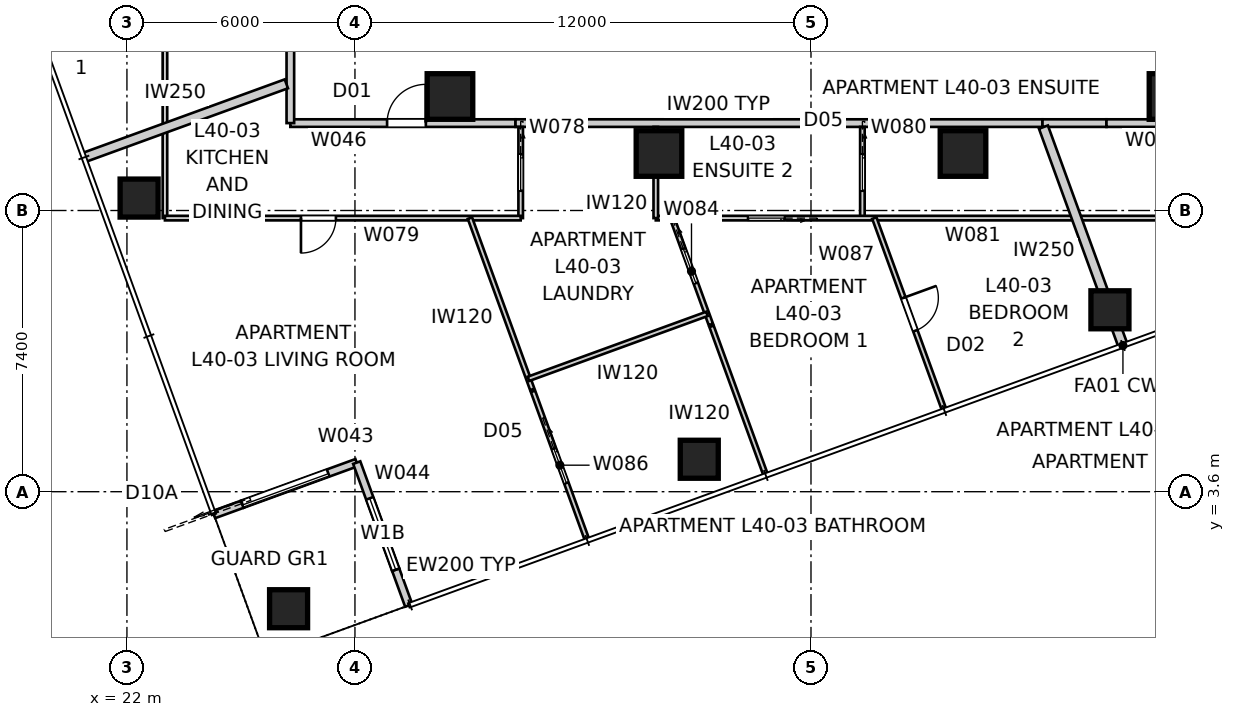
"""IFC4 building model, lengths in metres.
Left out: names, types, materials, properties, quantities, classifications, styles, units other than length and angle.
Written with IfcOpenShell. Run it as: python <this file> out.ifc"""

import sys

from ifc_helpers import new_model, si_unit, direction, frame, frame_2d, origin, origin_2d, place, context, subcontext, project, spatial, rectangle, extrude, element, fill, save


model = new_model("IFC4")
c1 = context("Model", 3, precision=1e-05, world=origin(), true_north=direction((0.0, 1.0)))
c2 = subcontext(c1, "Body", "Model", "MODEL_VIEW")
j1 = project(units=[si_unit("LENGTHUNIT", "METRE"), si_unit("PLANEANGLEUNIT", "RADIAN")], contexts=[c1])
p1 = place(None, origin())
s1 = spatial("IfcSite", under=j1, at=p1, CompositionType="ELEMENT")
p2 = place(p1, origin())
s2 = spatial("IfcBuilding", under=s1, at=p2, CompositionType="ELEMENT")
p3 = place(p2, frame((0.0, 0.0, 147.2)))
s3 = spatial("IfcBuildingStorey", under=s2, at=p3, CompositionType="ELEMENT", Elevation=147.2)
for number, where, z_axis, x_axis in (
    (1, (26.253, 0.521, 0.0), (0.0, 0.0, 1.0), (1.0, 0.0, 0.0)),
    (2, (37.06, 4.454, 0.0), (0.0, 0.0, 1.0), (1.0, 0.0, 0.0)),
    (3, (47.866, 8.387, 0.0), (0.0, 0.0, 1.0), (1.0, 0.0, 0.0)),
    (4, (22.32, 11.327, 0.0), (0.0, 0.0, 1.0), (1.0, 0.0, 0.0)),
):
    element("IfcColumn", number, at=place(p3, frame(where, z_axis=z_axis, x_axis=x_axis)), inside=s3, PredefinedType="COLUMN", context=c2, shape_type="SweptSolid", body=[
        extrude(rectangle(XDim=1.0, YDim=1.0, at=origin_2d()), origin(), (0.0, 0.0, 1.0), 3.4),
    ])
for number, where, z_axis, x_axis in (
    (5, (30.5, 14.0, 0.0), (0.0, 0.0, 1.0), (1.0, 0.0, 0.0)),
    (6, (36.0, 12.5, 0.0), (0.0, 0.0, 1.0), (1.0, 0.0, 0.0)),
    (7, (44.0, 12.5, 0.0), (0.0, 0.0, 1.0), (1.0, 0.0, 0.0)),
    (8, (49.5, 14.0, 0.0), (0.0, 0.0, 1.0), (1.0, 0.0, 0.0)),
):
    element("IfcColumn", number, at=place(p3, frame(where, z_axis=z_axis, x_axis=x_axis)), inside=s3, PredefinedType="COLUMN", context=c2, shape_type="SweptSolid", body=[
        extrude(rectangle(XDim=1.2, YDim=1.2, at=origin_2d()), origin(), (0.0, 0.0, 1.0), 3.4),
    ])
p4 = place(p3, frame((24.288, 2.998, 0.0), z_axis=(0.0, 0.0, 1.0), x_axis=(0.939659694648, 0.342110593602, 0.0)))
e9 = element("IfcWall", 9, at=p4, inside=s3, PredefinedType="SOLIDWALL", context=c2, shape_type="SweptSolid", body=[
    extrude(rectangle(XDim=0.8, YDim=0.2, at=frame_2d((0.4, 0.0))), origin(), (0.0, 0.0, 1.0), 3.25),
])
p5 = place(p3, frame((25.04, 3.271, 0.0), z_axis=(0.0, 0.0, 1.0), x_axis=(0.939693144909, 0.342018703306, 0.0)))
e10 = element("IfcWall", 10, at=p5, inside=s3, PredefinedType="SOLIDWALL", context=c2, shape_type="SweptSolid", body=[
    extrude(rectangle(XDim=3.2, YDim=0.2, at=frame_2d((1.6, 0.0))), origin(), (0.0, 0.0, 1.0), 2.722),
])
p6 = place(p5, origin())
e11 = element("IfcOpeningElement", 11, at=p6, cuts=e10, PredefinedType="OPENING", context=c2, shape_type="SweptSolid", body=[
    extrude(rectangle(XDim=2.4, YDim=2.1, at=frame_2d((1.2, 1.05))), frame((0.0, 0.11, 0.0), z_axis=(0.0, -1.0, 0.0), x_axis=(1.0, 0.0, 0.0)), (0.0, 0.0, 1.0), 0.22),
])
p7 = place(p3, frame((28.047, 4.366, 0.0), z_axis=(0.0, 0.0, 1.0), x_axis=(0.341965219194, -0.939712609717, 0.0)))
e12 = element("IfcWall", 12, at=p7, inside=s3, PredefinedType="SOLIDWALL", context=c2, shape_type="SweptSolid", body=[
    extrude(rectangle(XDim=3.0, YDim=0.2, at=frame_2d((1.5, 0.0))), origin(), (0.0, 0.0, 1.0), 2.722),
])
p8 = place(p7, frame((1.0, 0.0, 0.45)))
e13 = element("IfcOpeningElement", 13, at=p8, cuts=e12, PredefinedType="OPENING", context=c2, shape_type="SweptSolid", body=[
    extrude(rectangle(XDim=2.0, YDim=1.8, at=frame_2d((1.0, 0.9))), frame((0.0, 0.11, 0.0), z_axis=(0.0, -1.0, 0.0), x_axis=(1.0, 0.0, 0.0)), (0.0, 0.0, 1.0), 0.22),
])
p9 = place(p3, frame((29.073, 1.547, 0.0), z_axis=(0.0, 0.0, 1.0), x_axis=(0.342037080957, -0.939686455819, 0.0)))
e14 = element("IfcWall", 14, at=p9, inside=s3, PredefinedType="SOLIDWALL", context=c2, shape_type="SweptSolid", body=[
    extrude(rectangle(XDim=1.0, YDim=0.2, at=frame_2d((0.5, 0.0))), origin(), (0.0, 0.0, 1.0), 3.25),
])
p10 = place(p3, frame((26.3, 13.3, 0.0), z_axis=(0.0, 0.0, 1.0), x_axis=(1.0, 0.0, 0.0)))
e15 = element("IfcWall", 15, at=p10, inside=s3, PredefinedType="PARTITIONING", context=c2, shape_type="SweptSolid", body=[
    extrude(rectangle(XDim=5.925, YDim=0.2, at=frame_2d((2.962, 0.0))), origin(), (0.0, 0.0, 1.0), 3.25),
])
p11 = place(p10, frame((2.545, 0.0, 0.0)))
e16 = element("IfcOpeningElement", 16, at=p11, cuts=e15, PredefinedType="OPENING", context=c2, shape_type="SweptSolid", body=[
    extrude(rectangle(XDim=1.02, YDim=2.34, at=frame_2d((0.51, 1.17))), frame((0.0, 0.11, 0.0), z_axis=(0.0, -1.0, 0.0), x_axis=(1.0, 0.0, 0.0)), (0.0, 0.0, 1.0), 0.22),
])
p12 = place(p3, frame((32.225, 13.3, 0.0), z_axis=(0.0, 0.0, 1.0), x_axis=(1.0, 0.0, 0.0)))
e17 = element("IfcWall", 17, at=p12, inside=s3, PredefinedType="PARTITIONING", context=c2, shape_type="SweptSolid", body=[
    extrude(rectangle(XDim=1.684, YDim=0.2, at=frame_2d((0.842, 0.0))), origin(), (0.0, 0.0, 1.0), 2.55),
])
p13 = place(p3, frame((33.908, 13.3, 0.0), z_axis=(0.0, 0.0, 1.0), x_axis=(1.0, 0.0, 0.0)))
e18 = element("IfcWall", 18, at=p13, inside=s3, PredefinedType="PARTITIONING", context=c2, shape_type="SweptSolid", body=[
    extrude(rectangle(XDim=12.183, YDim=0.2, at=frame_2d((6.092, 0.0))), origin(), (0.0, 0.0, 1.0), 3.25),
])
p14 = place(p3, frame((46.092, 13.3, 0.0), z_axis=(0.0, 0.0, 1.0), x_axis=(1.0, 0.0, 0.0)))
e19 = element("IfcWall", 19, at=p14, inside=s3, PredefinedType="PARTITIONING", context=c2, shape_type="SweptSolid", body=[
    extrude(rectangle(XDim=1.684, YDim=0.2, at=frame_2d((0.842, 0.0))), origin(), (0.0, 0.0, 1.0), 2.55),
])
p15 = place(p3, frame((47.775, 13.3, 0.0), z_axis=(0.0, 0.0, 1.0), x_axis=(1.0, 0.0, 0.0)))
e20 = element("IfcWall", 20, at=p15, inside=s3, PredefinedType="PARTITIONING", context=c2, shape_type="SweptSolid", body=[
    extrude(rectangle(XDim=5.925, YDim=0.2, at=frame_2d((2.962, 0.0))), origin(), (0.0, 0.0, 1.0), 3.25),
])
p16 = place(p15, frame((2.453, 0.0, 0.0)))
e21 = element("IfcOpeningElement", 21, at=p16, cuts=e20, PredefinedType="OPENING", context=c2, shape_type="SweptSolid", body=[
    extrude(rectangle(XDim=1.02, YDim=2.34, at=frame_2d((0.51, 1.17))), frame((0.0, 0.11, 0.0), z_axis=(0.0, -1.0, 0.0), x_axis=(1.0, 0.0, 0.0)), (0.0, 0.0, 1.0), 0.22),
])
p17 = place(p3, frame((26.3, 46.3, 0.0), z_axis=(0.0, 0.0, 1.0), x_axis=(0.0, -1.0, 0.0)))
e22 = element("IfcWall", 22, at=p17, inside=s3, PredefinedType="PARTITIONING", context=c2, shape_type="SweptSolid", body=[
    extrude(rectangle(XDim=33.0, YDim=0.2, at=frame_2d((16.5, 0.0))), origin(), (0.0, 0.0, 1.0), 3.25),
])
p18 = place(p17, frame((13.229, 0.0, 0.0)))
e23 = element("IfcOpeningElement", 23, at=p18, cuts=e22, PredefinedType="OPENING", context=c2, shape_type="SweptSolid", body=[
    extrude(rectangle(XDim=1.02, YDim=2.34, at=frame_2d((0.51, 1.17))), frame((0.0, 0.11, 0.0), z_axis=(0.0, -1.0, 0.0), x_axis=(1.0, 0.0, 0.0)), (0.0, 0.0, 1.0), 0.22),
])
p19 = place(p17, frame((28.51, 0.0, 0.0)))
e24 = element("IfcOpeningElement", 24, at=p19, cuts=e22, PredefinedType="OPENING", context=c2, shape_type="SweptSolid", body=[
    extrude(rectangle(XDim=1.02, YDim=2.34, at=frame_2d((0.51, 1.17))), frame((0.0, 0.11, 0.0), z_axis=(0.0, -1.0, 0.0), x_axis=(1.0, 0.0, 0.0)), (0.0, 0.0, 1.0), 0.22),
])
p20 = place(p17, frame((1.998, 0.0, 0.0)))
e25 = element("IfcOpeningElement", 25, at=p20, cuts=e22, PredefinedType="OPENING", context=c2, shape_type="SweptSolid", body=[
    extrude(rectangle(XDim=1.02, YDim=2.34, at=frame_2d((0.51, 1.17))), frame((0.0, 0.11, 0.0), z_axis=(0.0, -1.0, 0.0), x_axis=(1.0, 0.0, 0.0)), (0.0, 0.0, 1.0), 0.22),
])
p21 = place(p3, frame((48.208, 7.447, 0.0), z_axis=(0.0, 0.0, 1.0), x_axis=(-0.341999444481, 0.939700154291, 0.0)))
e26 = element("IfcWall", 26, at=p21, inside=s3, PredefinedType="PARTITIONING", context=c2, shape_type="SweptSolid", body=[
    extrude(rectangle(XDim=6.116, YDim=0.25, at=frame_2d((3.058, 0.0))), origin(), (0.0, 0.0, 1.0), 3.25),
])
p22 = place(p3, frame((20.868, 12.395, 0.0), z_axis=(0.0, 0.0, 1.0), x_axis=(0.939690274876, 0.342026588591, 0.0)))
e27 = element("IfcWall", 27, at=p22, inside=s3, PredefinedType="PARTITIONING", context=c2, shape_type="SweptSolid", body=[
    extrude(rectangle(XDim=5.669, YDim=0.25, at=frame_2d((2.834, 0.0))), origin(), (0.0, 0.0, 1.0), 3.25),
])
p23 = place(p3, frame((23.0, 10.8, 0.0), z_axis=(0.0, 0.0, 1.0), x_axis=(0.0, 1.0, 0.0)))
e28 = element("IfcWall", 28, at=p23, inside=s3, PredefinedType="PARTITIONING", context=c2, shape_type="SweptSolid", body=[
    extrude(rectangle(XDim=38.0, YDim=0.12, at=frame_2d((19.0, 0.0))), origin(), (0.0, 0.0, 1.0), 2.55),
])
p24 = place(p23, frame((20.674, 0.0, 0.0)))
e29 = element("IfcOpeningElement", 29, at=p24, cuts=e28, PredefinedType="OPENING", context=c2, shape_type="SweptSolid", body=[
    extrude(rectangle(XDim=0.92, YDim=2.34, at=frame_2d((0.46, 1.17))), frame((0.0, 0.07, 0.0), z_axis=(0.0, -1.0, 0.0), x_axis=(1.0, 0.0, 0.0)), (0.0, 0.0, 1.0), 0.14),
])
p25 = place(p23, frame((4.598, 0.0, 0.0)))
e30 = element("IfcOpeningElement", 30, at=p25, cuts=e28, PredefinedType="OPENING", context=c2, shape_type="SweptSolid", body=[
    extrude(rectangle(XDim=0.92, YDim=2.34, at=frame_2d((0.46, 1.17))), frame((0.0, 0.07, 0.0), z_axis=(0.0, -1.0, 0.0), x_axis=(1.0, 0.0, 0.0)), (0.0, 0.0, 1.0), 0.14),
])
p26 = place(p23, frame((8.043, 0.0, 0.0)))
e31 = element("IfcOpeningElement", 31, at=p26, cuts=e28, PredefinedType="OPENING", context=c2, shape_type="SweptSolid", body=[
    extrude(rectangle(XDim=0.92, YDim=2.34, at=frame_2d((0.46, 1.17))), frame((0.0, 0.07, 0.0), z_axis=(0.0, -1.0, 0.0), x_axis=(1.0, 0.0, 0.0)), (0.0, 0.0, 1.0), 0.14),
])
p27 = place(p23, frame((33.957, 0.0, 0.0)))
e32 = element("IfcOpeningElement", 32, at=p27, cuts=e28, PredefinedType="OPENING", context=c2, shape_type="SweptSolid", body=[
    extrude(rectangle(XDim=0.92, YDim=2.34, at=frame_2d((0.46, 1.17))), frame((0.0, 0.07, 0.0), z_axis=(0.0, -1.0, 0.0), x_axis=(1.0, 0.0, 0.0)), (0.0, 0.0, 1.0), 0.14),
])
p28 = place(p23, frame((26.957, 0.0, 0.0)))
e33 = element("IfcOpeningElement", 33, at=p28, cuts=e28, PredefinedType="OPENING", context=c2, shape_type="SweptSolid", body=[
    extrude(rectangle(XDim=0.96, YDim=2.1, at=frame_2d((0.48, 1.05))), frame((0.0, 0.07, 0.0), z_axis=(0.0, -1.0, 0.0), x_axis=(1.0, 0.0, 0.0)), (0.0, 0.0, 1.0), 0.14),
])
p29 = place(p3, frame((32.361, 13.2, 0.0), z_axis=(0.0, 0.0, 1.0), x_axis=(0.0, -1.0, 0.0)))
e34 = element("IfcWall", 34, at=p29, inside=s3, PredefinedType="PARTITIONING", context=c2, shape_type="SweptSolid", body=[
    extrude(rectangle(XDim=2.4, YDim=0.12, at=frame_2d((1.2, 0.0))), origin(), (0.0, 0.0, 1.0), 3.25),
])
p30 = place(p29, frame((0.72, 0.0, 0.0)))
e35 = element("IfcOpeningElement", 35, at=p30, cuts=e34, PredefinedType="OPENING", context=c2, shape_type="SweptSolid", body=[
    extrude(rectangle(XDim=0.96, YDim=2.1, at=frame_2d((0.48, 1.05))), frame((0.0, 0.07, 0.0), z_axis=(0.0, -1.0, 0.0), x_axis=(1.0, 0.0, 0.0)), (0.0, 0.0, 1.0), 0.14),
])
p31 = place(p3, frame((32.361, 10.8, 0.0), z_axis=(0.0, 0.0, 1.0), x_axis=(-1.0, 0.0, 0.0)))
e36 = element("IfcWall", 36, at=p31, inside=s3, PredefinedType="PARTITIONING", context=c2, shape_type="SweptSolid", body=[
    extrude(rectangle(XDim=9.361, YDim=0.12, at=frame_2d((4.681, 0.0))), origin(), (0.0, 0.0, 1.0), 3.25),
])
p32 = place(p31, frame((4.862, 0.0, 0.0)))
e37 = element("IfcOpeningElement", 37, at=p32, cuts=e36, PredefinedType="OPENING", context=c2, shape_type="SweptSolid", body=[
    extrude(rectangle(XDim=0.92, YDim=2.34, at=frame_2d((0.46, 1.17))), frame((0.0, 0.07, 0.0), z_axis=(0.0, -1.0, 0.0), x_axis=(1.0, 0.0, 0.0)), (0.0, 0.0, 1.0), 0.14),
])
p33 = place(p3, frame((41.353, 13.2, 0.0), z_axis=(0.0, 0.0, 1.0), x_axis=(0.0, -1.0, 0.0)))
e38 = element("IfcWall", 38, at=p33, inside=s3, PredefinedType="PARTITIONING", context=c2, shape_type="SweptSolid", body=[
    extrude(rectangle(XDim=2.4, YDim=0.12, at=frame_2d((1.2, 0.0))), origin(), (0.0, 0.0, 1.0), 3.25),
])
p34 = place(p33, frame((0.72, 0.0, 0.0)))
e39 = element("IfcOpeningElement", 39, at=p34, cuts=e38, PredefinedType="OPENING", context=c2, shape_type="SweptSolid", body=[
    extrude(rectangle(XDim=0.96, YDim=2.1, at=frame_2d((0.48, 1.05))), frame((0.0, 0.07, 0.0), z_axis=(0.0, -1.0, 0.0), x_axis=(1.0, 0.0, 0.0)), (0.0, 0.0, 1.0), 0.14),
])
p35 = place(p3, frame((53.8, 10.8, 0.0), z_axis=(0.0, 0.0, 1.0), x_axis=(-1.0, 0.0, 0.0)))
e40 = element("IfcWall", 40, at=p35, inside=s3, PredefinedType="PARTITIONING", context=c2, shape_type="SweptSolid", body=[
    extrude(rectangle(XDim=17.884, YDim=0.12, at=frame_2d((8.942, 0.0))), origin(), (0.0, 0.0, 1.0), 3.25),
])
p36 = place(p35, frame((3.665, 0.0, 0.0)))
e41 = element("IfcOpeningElement", 41, at=p36, cuts=e40, PredefinedType="OPENING", context=c2, shape_type="SweptSolid", body=[
    extrude(rectangle(XDim=0.92, YDim=2.34, at=frame_2d((0.46, 1.17))), frame((0.0, 0.07, 0.0), z_axis=(0.0, -1.0, 0.0), x_axis=(1.0, 0.0, 0.0)), (0.0, 0.0, 1.0), 0.14),
])
p37 = place(p35, frame((14.497, 0.0, 0.0)))
e42 = element("IfcOpeningElement", 42, at=p37, cuts=e40, PredefinedType="OPENING", context=c2, shape_type="SweptSolid", body=[
    extrude(rectangle(XDim=0.96, YDim=2.1, at=frame_2d((0.48, 1.05))), frame((0.0, 0.07, 0.0), z_axis=(0.0, -1.0, 0.0), x_axis=(1.0, 0.0, 0.0)), (0.0, 0.0, 1.0), 0.14),
])
p38 = place(p3, frame((35.916, 10.8, 0.0), z_axis=(0.0, 0.0, 1.0), x_axis=(0.0, 1.0, 0.0)))
e43 = element("IfcWall", 43, at=p38, inside=s3, PredefinedType="PARTITIONING", context=c2, shape_type="SweptSolid", body=[
    extrude(rectangle(XDim=2.4, YDim=0.12, at=frame_2d((1.2, 0.0))), origin(), (0.0, 0.0, 1.0), 3.25),
])
p39 = place(p3, frame((32.666, 6.292, 0.0), z_axis=(0.0, 0.0, 1.0), x_axis=(-0.341988220281, 0.93970423921, 0.0)))
e44 = element("IfcWall", 44, at=p39, inside=s3, PredefinedType="PARTITIONING", context=c2, shape_type="SweptSolid", body=[
    extrude(rectangle(XDim=4.797, YDim=0.12, at=frame_2d((2.399, 0.0))), origin(), (0.0, 0.0, 1.0), 3.25),
])
p40 = place(p3, frame((36.346, 10.8, 0.0), z_axis=(0.0, 0.0, 1.0), x_axis=(0.341986632257, -0.939704817141, 0.0)))
e45 = element("IfcWall", 45, at=p40, inside=s3, PredefinedType="PARTITIONING", context=c2, shape_type="SweptSolid", body=[
    extrude(rectangle(XDim=2.978, YDim=0.12, at=frame_2d((1.489, 0.0))), origin(), (0.0, 0.0, 1.0), 3.25),
])
p41 = place(p40, frame((0.861, 0.0, 0.0)))
e46 = element("IfcOpeningElement", 46, at=p41, cuts=e45, PredefinedType="OPENING", context=c2, shape_type="SweptSolid", body=[
    extrude(rectangle(XDim=0.96, YDim=2.1, at=frame_2d((0.48, 1.05))), frame((0.0, 0.07, 0.0), z_axis=(0.0, -1.0, 0.0), x_axis=(1.0, 0.0, 0.0)), (0.0, 0.0, 1.0), 0.14),
])
p42 = place(p3, frame((37.264, 8.28, 0.0), z_axis=(0.0, 0.0, 1.0), x_axis=(-0.939686455819, -0.342037080957, 0.0)))
e47 = element("IfcWall", 47, at=p42, inside=s3, PredefinedType="PARTITIONING", context=c2, shape_type="SweptSolid", body=[
    extrude(rectangle(XDim=5.0, YDim=0.12, at=frame_2d((2.5, 0.0))), origin(), (0.0, 0.0, 1.0), 3.25),
])
p43 = place(p3, frame((32.685, 6.241, 0.0), z_axis=(0.0, 0.0, 1.0), x_axis=(0.342036918442, -0.939686514973, 0.0)))
e48 = element("IfcWall", 48, at=p43, inside=s3, PredefinedType="PARTITIONING", context=c2, shape_type="SweptSolid", body=[
    extrude(rectangle(XDim=4.136, YDim=0.12, at=frame_2d((2.068, 0.0))), origin(), (0.0, 0.0, 1.0), 3.25),
])
p44 = place(p43, frame((1.608, 0.0, 0.0)))
e49 = element("IfcOpeningElement", 49, at=p44, cuts=e48, PredefinedType="OPENING", context=c2, shape_type="SweptSolid", body=[
    extrude(rectangle(XDim=0.96, YDim=2.1, at=frame_2d((0.48, 1.05))), frame((0.0, 0.07, 0.0), z_axis=(0.0, -1.0, 0.0), x_axis=(1.0, 0.0, 0.0)), (0.0, 0.0, 1.0), 0.14),
])
p45 = place(p3, frame((41.667, 10.8, 0.0), z_axis=(0.0, 0.0, 1.0), x_axis=(0.341995981916, -0.939701414468, 0.0)))
e50 = element("IfcWall", 50, at=p45, inside=s3, PredefinedType="PARTITIONING", context=c2, shape_type="SweptSolid", body=[
    extrude(rectangle(XDim=5.348, YDim=0.12, at=frame_2d((2.674, 0.0))), origin(), (0.0, 0.0, 1.0), 3.25),
])
p46 = place(p45, frame((2.234, 0.0, 0.0)))
e51 = element("IfcOpeningElement", 51, at=p46, cuts=e50, PredefinedType="OPENING", context=c2, shape_type="SweptSolid", body=[
    extrude(rectangle(XDim=0.92, YDim=2.34, at=frame_2d((0.46, 1.17))), frame((0.0, 0.07, 0.0), z_axis=(0.0, -1.0, 0.0), x_axis=(1.0, 0.0, 0.0)), (0.0, 0.0, 1.0), 0.14),
])
p47 = place(p3, frame((38.798, 4.065, 0.0), z_axis=(0.0, 0.0, 1.0), x_axis=(-0.342036918442, 0.939686514973, 0.0)))
e52 = element("IfcWall", 52, at=p47, inside=s3, PredefinedType="PARTITIONING", context=c2, shape_type="SweptSolid", body=[
    extrude(rectangle(XDim=4.136, YDim=0.12, at=frame_2d((2.068, 0.0))), origin(), (0.0, 0.0, 1.0), 3.25),
])
p48 = place(p6, origin())
e53 = element("IfcDoor", 53, at=p48, inside=s3, OperationType="SLIDING_TO_LEFT", PredefinedType="DOOR", context=c2, shape_type="SweptSolid", body=[
    extrude(rectangle(XDim=2.4, YDim=2.1, at=frame_2d((1.2, 1.05))), frame((0.0, 0.025, 0.0), z_axis=(0.0, -1.0, 0.0), x_axis=(1.0, 0.0, 0.0)), (0.0, 0.0, 1.0), 0.05),
])
fill(e11, e53)
p49 = place(p8, origin())
e54 = element("IfcWindow", 54, at=p49, inside=s3, PartitioningType="SINGLE_PANEL", PredefinedType="WINDOW", context=c2, shape_type="SweptSolid", body=[
    extrude(rectangle(XDim=2.0, YDim=1.8, at=frame_2d((1.0, 0.9))), frame((0.0, 0.03, 0.0), z_axis=(0.0, -1.0, 0.0), x_axis=(1.0, 0.0, 0.0)), (0.0, 0.0, 1.0), 0.06),
])
fill(e13, e54)
p50 = place(p11, origin())
e55 = element("IfcDoor", 55, at=p50, inside=s3, OperationType="SINGLE_SWING_RIGHT", PredefinedType="DOOR", context=c2, shape_type="SweptSolid", body=[
    extrude(rectangle(XDim=1.02, YDim=2.34, at=frame_2d((0.51, 1.17))), frame((0.0, 0.025, 0.0), z_axis=(0.0, -1.0, 0.0), x_axis=(1.0, 0.0, 0.0)), (0.0, 0.0, 1.0), 0.05),
])
fill(e16, e55)
p51 = place(p32, origin())
e56 = element("IfcDoor", 56, at=p51, inside=s3, OperationType="SINGLE_SWING_RIGHT", PredefinedType="DOOR", context=c2, shape_type="SweptSolid", body=[
    extrude(rectangle(XDim=0.92, YDim=2.34, at=frame_2d((0.46, 1.17))), frame((0.0, 0.025, 0.0), z_axis=(0.0, -1.0, 0.0), x_axis=(1.0, 0.0, 0.0)), (0.0, 0.0, 1.0), 0.05),
])
fill(e37, e56)
p52 = place(p30, origin())
e57 = element("IfcDoor", 57, at=p52, inside=s3, OperationType="SLIDING_TO_LEFT", PredefinedType="DOOR", context=c2, shape_type="SweptSolid", body=[
    extrude(rectangle(XDim=0.96, YDim=2.1, at=frame_2d((0.48, 1.05))), frame((0.0, 0.025, 0.0), z_axis=(0.0, -1.0, 0.0), x_axis=(1.0, 0.0, 0.0)), (0.0, 0.0, 1.0), 0.05),
])
fill(e35, e57)
p53 = place(p44, origin())
e58 = element("IfcDoor", 58, at=p53, inside=s3, OperationType="SLIDING_TO_LEFT", PredefinedType="DOOR", context=c2, shape_type="SweptSolid", body=[
    extrude(rectangle(XDim=0.96, YDim=2.1, at=frame_2d((0.48, 1.05))), frame((0.0, 0.025, 0.0), z_axis=(0.0, -1.0, 0.0), x_axis=(1.0, 0.0, 0.0)), (0.0, 0.0, 1.0), 0.05),
])
fill(e49, e58)
p54 = place(p41, origin())
e59 = element("IfcDoor", 59, at=p54, inside=s3, OperationType="SLIDING_TO_LEFT", PredefinedType="DOOR", context=c2, shape_type="SweptSolid", body=[
    extrude(rectangle(XDim=0.96, YDim=2.1, at=frame_2d((0.48, 1.05))), frame((0.0, 0.025, 0.0), z_axis=(0.0, -1.0, 0.0), x_axis=(1.0, 0.0, 0.0)), (0.0, 0.0, 1.0), 0.05),
])
fill(e46, e59)
p55 = place(p46, origin())
e60 = element("IfcDoor", 60, at=p55, inside=s3, OperationType="SINGLE_SWING_LEFT", PredefinedType="DOOR", context=c2, shape_type="SweptSolid", body=[
    extrude(rectangle(XDim=0.92, YDim=2.34, at=frame_2d((0.46, 1.17))), frame((0.0, 0.025, 0.0), z_axis=(0.0, -1.0, 0.0), x_axis=(1.0, 0.0, 0.0)), (0.0, 0.0, 1.0), 0.05),
])
fill(e51, e60)
p56 = place(p37, origin())
e61 = element("IfcDoor", 61, at=p56, inside=s3, OperationType="SLIDING_TO_LEFT", PredefinedType="DOOR", context=c2, shape_type="SweptSolid", body=[
    extrude(rectangle(XDim=0.96, YDim=2.1, at=frame_2d((0.48, 1.05))), frame((0.0, 0.025, 0.0), z_axis=(0.0, -1.0, 0.0), x_axis=(1.0, 0.0, 0.0)), (0.0, 0.0, 1.0), 0.05),
])
fill(e42, e61)
p57 = place(p34, origin())
e62 = element("IfcDoor", 62, at=p57, inside=s3, OperationType="SLIDING_TO_LEFT", PredefinedType="DOOR", context=c2, shape_type="SweptSolid", body=[
    extrude(rectangle(XDim=0.96, YDim=2.1, at=frame_2d((0.48, 1.05))), frame((0.0, 0.025, 0.0), z_axis=(0.0, -1.0, 0.0), x_axis=(1.0, 0.0, 0.0)), (0.0, 0.0, 1.0), 0.05),
])
fill(e39, e62)
save(model, sys.argv[1])
